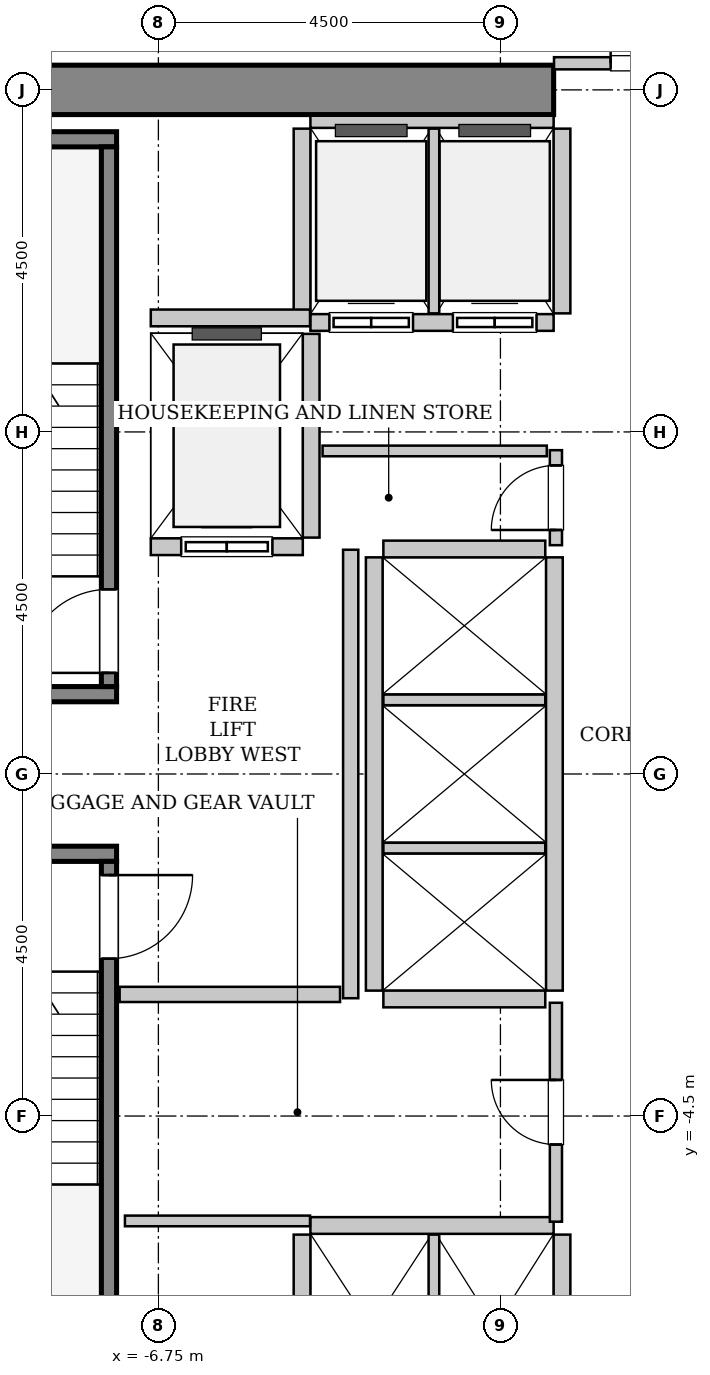
"""IFC4 building model, lengths in metres.
Left out: names, types, materials, properties, quantities, classifications, styles, units other than length and angle.
Written with IfcOpenShell. Run it as: python <this file> out.ifc"""

import sys

from ifc_helpers import new_model, si_unit, direction, frame, frame_2d, origin, place, context, subcontext, project, spatial, rectangle, extrude, source, transform, mapped, element, fill, save


model = new_model("IFC4")
c1 = context("Model", 3, precision=1e-05, world=origin(), true_north=direction((0.0, 1.0)))
c2 = subcontext(c1, "Body", "Model", "MODEL_VIEW")
j1 = project(units=[si_unit("LENGTHUNIT", "METRE"), si_unit("PLANEANGLEUNIT", "RADIAN")], contexts=[c1])
p1 = place(None, origin())
s1 = spatial("IfcSite", under=j1, at=p1, CompositionType="ELEMENT")
p2 = place(p1, origin())
s2 = spatial("IfcBuilding", under=s1, at=p2, CompositionType="ELEMENT")
p3 = place(p2, frame((0.0, 0.0, 36.8)))
s3 = spatial("IfcBuildingStorey", under=s2, at=p3, CompositionType="ELEMENT", Elevation=36.8)
m1 = source(origin(), c2, "Body", "SweptSolid", [
    extrude(rectangle(XDim=10.025, YDim=0.65, at=frame_2d((5.012, 0.0))), origin(), (0.0, 0.0, 1.0), 3.8),
])
p4 = place(p3, frame((-11.575, 9.0, 0.0), z_axis=(0.0, 0.0, 1.0), x_axis=(1.0, 0.0, 0.0)))
e1 = element("IfcWall", 1, at=p4, inside=s3, PredefinedType="SHEAR", context=c2, shape_type="MappedRepresentation", body=[
    mapped(m1, transform((0.0, 0.0, 0.0), x_axis=(1.0, 0.0, 0.0), y_axis=(0.0, 1.0, 0.0), z_axis=(0.0, 0.0, 1.0), scale=1.0)),
])
m2 = source(origin(), c2, "Body", "SweptSolid", [
    extrude(rectangle(XDim=3.4, YDim=0.2, at=frame_2d((1.7, 0.0))), origin(), (0.0, 0.0, 1.0), 3.8),
])
p5 = place(p3, frame((-7.3, 1.05, 0.0), z_axis=(0.0, 0.0, 1.0), x_axis=(-1.0, 0.0, 0.0)))
e2 = element("IfcWall", 2, at=p5, inside=s3, PredefinedType="SOLIDWALL", context=c2, shape_type="MappedRepresentation", body=[
    mapped(m2, transform((0.0, 0.0, 0.0), x_axis=(1.0, 0.0, 0.0), y_axis=(0.0, 1.0, 0.0), z_axis=(0.0, 0.0, 1.0), scale=1.0)),
])
m3 = source(origin(), c2, "Body", "SweptSolid", [
    extrude(rectangle(XDim=3.63, YDim=0.2, at=frame_2d((1.815, 0.0))), origin(), (0.0, 0.0, 1.0), 3.8),
])
p6 = place(p3, frame((-7.3, 8.35, 0.0), z_axis=(0.0, 0.0, 1.0), x_axis=(-1.0, 0.0, 0.0)))
e3 = element("IfcWall", 3, at=p6, inside=s3, PredefinedType="SOLIDWALL", context=c2, shape_type="MappedRepresentation", body=[
    mapped(m3, transform((0.0, 0.0, 0.0), x_axis=(1.0, 0.0, 0.0), y_axis=(0.0, 1.0, 0.0), z_axis=(0.0, 0.0, 1.0), scale=1.0)),
])
m4 = source(origin(), c2, "Body", "SweptSolid", [
    extrude(rectangle(XDim=7.1, YDim=0.2, at=frame_2d((3.55, 0.0))), origin(), (0.0, 0.0, 1.0), 3.8),
])
p7 = place(p3, frame((-7.4, 1.15, 0.0), z_axis=(0.0, 0.0, 1.0), x_axis=(0.0, 1.0, 0.0)))
e4 = element("IfcWall", 4, at=p7, inside=s3, PredefinedType="SOLIDWALL", context=c2, shape_type="MappedRepresentation", body=[
    mapped(m4, transform((0.0, 0.0, 0.0), x_axis=(1.0, 0.0, 0.0), y_axis=(0.0, 1.0, 0.0), z_axis=(0.0, 0.0, 1.0), scale=1.0)),
])
p8 = place(p7, frame((0.18, 0.0, 0.0)))
e5 = element("IfcOpeningElement", 5, at=p8, cuts=e4, PredefinedType="OPENING", context=c2, shape_type="SweptSolid", body=[
    extrude(rectangle(XDim=1.1, YDim=2.15, at=frame_2d((0.55, 1.075))), frame((0.0, 0.11, 0.0), z_axis=(0.0, -1.0, 0.0), x_axis=(1.0, 0.0, 0.0)), (0.0, 0.0, 1.0), 0.22),
])
p9 = place(p3, frame((-10.7, -1.05, 0.0), z_axis=(0.0, 0.0, 1.0), x_axis=(1.0, 0.0, 0.0)))
e6 = element("IfcWall", 6, at=p9, inside=s3, PredefinedType="SOLIDWALL", context=c2, shape_type="MappedRepresentation", body=[
    mapped(m2, transform((0.0, 0.0, 0.0), x_axis=(1.0, 0.0, 0.0), y_axis=(0.0, 1.0, 0.0), z_axis=(0.0, 0.0, 1.0), scale=1.0)),
])
p10 = place(p3, frame((-7.4, -1.15, 0.0), z_axis=(0.0, 0.0, 1.0), x_axis=(0.0, -1.0, 0.0)))
e7 = element("IfcWall", 7, at=p10, inside=s3, PredefinedType="SOLIDWALL", context=c2, shape_type="MappedRepresentation", body=[
    mapped(m4, transform((0.0, 0.0, 0.0), x_axis=(1.0, 0.0, 0.0), y_axis=(0.0, 1.0, 0.0), z_axis=(0.0, 0.0, 1.0), scale=1.0)),
])
p11 = place(p10, frame((0.18, 0.0, 0.0)))
e8 = element("IfcOpeningElement", 8, at=p11, cuts=e7, PredefinedType="OPENING", context=c2, shape_type="SweptSolid", body=[
    extrude(rectangle(XDim=1.1, YDim=2.15, at=frame_2d((0.55, 1.075))), frame((0.0, 0.11, 0.0), z_axis=(0.0, -1.0, 0.0), x_axis=(1.0, 0.0, 0.0)), (0.0, 0.0, 1.0), 0.22),
])
m5 = source(origin(), c2, "Body", "SweptSolid", [
    extrude(rectangle(XDim=2.0, YDim=0.22, at=frame_2d((1.0, 0.0))), origin(), (0.0, 0.0, 1.0), 3.535),
])
p12 = place(p3, frame((-6.85, 2.99, 0.0), z_axis=(0.0, 0.0, 1.0), x_axis=(1.0, 0.0, 0.0)))
e9 = element("IfcWall", 9, at=p12, inside=s3, PredefinedType="SOLIDWALL", context=c2, shape_type="MappedRepresentation", body=[
    mapped(m5, transform((0.0, 0.0, 0.0), x_axis=(1.0, 0.0, 0.0), y_axis=(0.0, 1.0, 0.0), z_axis=(0.0, 0.0, 1.0), scale=1.0)),
])
p13 = place(p12, frame((0.4, 0.0, 0.0)))
e10 = element("IfcOpeningElement", 10, at=p13, cuts=e9, PredefinedType="OPENING", context=c2, shape_type="SweptSolid", body=[
    extrude(rectangle(XDim=1.2, YDim=2.2, at=frame_2d((0.6, 1.1))), frame((0.0, 0.12, 0.0), z_axis=(0.0, -1.0, 0.0), x_axis=(1.0, 0.0, 0.0)), (0.0, 0.0, 1.0), 0.24),
])
m6 = source(origin(), c2, "Body", "SweptSolid", [
    extrude(rectangle(XDim=2.68, YDim=0.22, at=frame_2d((1.34, 0.0))), origin(), (0.0, 0.0, 1.0), 3.535),
])
p14 = place(p3, frame((-4.74, 3.11, 0.0), z_axis=(0.0, 0.0, 1.0), x_axis=(0.0, 1.0, 0.0)))
e11 = element("IfcWall", 11, at=p14, inside=s3, PredefinedType="SOLIDWALL", context=c2, shape_type="MappedRepresentation", body=[
    mapped(m6, transform((0.0, 0.0, 0.0), x_axis=(1.0, 0.0, 0.0), y_axis=(0.0, 1.0, 0.0), z_axis=(0.0, 0.0, 1.0), scale=1.0)),
])
m7 = source(origin(), c2, "Body", "SweptSolid", [
    extrude(rectangle(XDim=3.2, YDim=0.22, at=frame_2d((1.6, 0.0))), origin(), (0.0, 0.0, 1.0), 3.535),
])
p15 = place(p3, frame((-4.75, 5.94, 0.0), z_axis=(0.0, 0.0, 1.0), x_axis=(1.0, 0.0, 0.0)))
e12 = element("IfcWall", 12, at=p15, inside=s3, PredefinedType="SOLIDWALL", context=c2, shape_type="MappedRepresentation", body=[
    mapped(m7, transform((0.0, 0.0, 0.0), x_axis=(1.0, 0.0, 0.0), y_axis=(0.0, 1.0, 0.0), z_axis=(0.0, 0.0, 1.0), scale=1.0)),
])
p16 = place(p15, frame((0.25, 0.0, 0.0)))
e13 = element("IfcOpeningElement", 13, at=p16, cuts=e12, PredefinedType="OPENING", context=c2, shape_type="SweptSolid", body=[
    extrude(rectangle(XDim=1.1, YDim=2.2, at=frame_2d((0.55, 1.1))), frame((0.0, 0.12, 0.0), z_axis=(0.0, -1.0, 0.0), x_axis=(1.0, 0.0, 0.0)), (0.0, 0.0, 1.0), 0.24),
])
p17 = place(p15, frame((1.875, 0.0, 0.0)))
e14 = element("IfcOpeningElement", 14, at=p17, cuts=e12, PredefinedType="OPENING", context=c2, shape_type="SweptSolid", body=[
    extrude(rectangle(XDim=1.1, YDim=2.2, at=frame_2d((0.55, 1.1))), frame((0.0, 0.12, 0.0), z_axis=(0.0, -1.0, 0.0), x_axis=(1.0, 0.0, 0.0)), (0.0, 0.0, 1.0), 0.24),
])
m8 = source(origin(), c2, "Body", "SweptSolid", [
    extrude(rectangle(XDim=3.2, YDim=0.16, at=frame_2d((1.6, 0.0))), origin(), (0.0, 0.0, 1.0), 2.425),
])
p18 = place(p3, frame((-1.55, 8.58, 0.0), z_axis=(0.0, 0.0, 1.0), x_axis=(-1.0, 0.0, 0.0)))
e15 = element("IfcWall", 15, at=p18, inside=s3, PredefinedType="PARTITIONING", context=c2, shape_type="MappedRepresentation", body=[
    mapped(m8, transform((0.0, 0.0, 0.0), x_axis=(1.0, 0.0, 0.0), y_axis=(0.0, 1.0, 0.0), z_axis=(0.0, 0.0, 1.0), scale=1.0)),
])
m9 = source(origin(), c2, "Body", "SweptSolid", [
    extrude(rectangle(XDim=2.43, YDim=0.22, at=frame_2d((1.215, 0.0))), origin(), (0.0, 0.0, 1.0), 3.535),
])
p19 = place(p3, frame((-4.86, 8.49, 0.0), z_axis=(0.0, 0.0, 1.0), x_axis=(0.0, -1.0, 0.0)))
e16 = element("IfcWall", 16, at=p19, inside=s3, PredefinedType="SOLIDWALL", context=c2, shape_type="MappedRepresentation", body=[
    mapped(m9, transform((0.0, 0.0, 0.0), x_axis=(1.0, 0.0, 0.0), y_axis=(0.0, 1.0, 0.0), z_axis=(0.0, 0.0, 1.0), scale=1.0)),
])
m10 = source(origin(), c2, "Body", "SweptSolid", [
    extrude(rectangle(XDim=2.43, YDim=0.14, at=frame_2d((1.215, 0.0))), origin(), (0.0, 0.0, 1.0), 3.535),
])
p20 = place(p3, frame((-3.125, 6.06, 0.0), z_axis=(0.0, 0.0, 1.0), x_axis=(0.0, 1.0, 0.0)))
e17 = element("IfcWall", 17, at=p20, inside=s3, PredefinedType="PARTITIONING", context=c2, shape_type="MappedRepresentation", body=[
    mapped(m10, transform((0.0, 0.0, 0.0), x_axis=(1.0, 0.0, 0.0), y_axis=(0.0, 1.0, 0.0), z_axis=(0.0, 0.0, 1.0), scale=1.0)),
])
p21 = place(p3, frame((-1.44, 6.06, 0.0), z_axis=(0.0, 0.0, 1.0), x_axis=(0.0, 1.0, 0.0)))
e18 = element("IfcWall", 18, at=p21, inside=s3, PredefinedType="SOLIDWALL", context=c2, shape_type="MappedRepresentation", body=[
    mapped(m9, transform((0.0, 0.0, 0.0), x_axis=(1.0, 0.0, 0.0), y_axis=(0.0, 1.0, 0.0), z_axis=(0.0, 0.0, 1.0), scale=1.0)),
])
p22 = place(p3, frame((-1.55, -5.94, 0.0), z_axis=(0.0, 0.0, 1.0), x_axis=(-1.0, 0.0, 0.0)))
e19 = element("IfcWall", 19, at=p22, inside=s3, PredefinedType="SOLIDWALL", context=c2, shape_type="MappedRepresentation", body=[
    mapped(m7, transform((0.0, 0.0, 0.0), x_axis=(1.0, 0.0, 0.0), y_axis=(0.0, 1.0, 0.0), z_axis=(0.0, 0.0, 1.0), scale=1.0)),
])
p23 = place(p3, frame((-4.86, -6.06, 0.0), z_axis=(0.0, 0.0, 1.0), x_axis=(0.0, -1.0, 0.0)))
e20 = element("IfcWall", 20, at=p23, inside=s3, PredefinedType="SOLIDWALL", context=c2, shape_type="MappedRepresentation", body=[
    mapped(m9, transform((0.0, 0.0, 0.0), x_axis=(1.0, 0.0, 0.0), y_axis=(0.0, 1.0, 0.0), z_axis=(0.0, 0.0, 1.0), scale=1.0)),
])
p24 = place(p3, frame((-3.125, -8.49, 0.0), z_axis=(0.0, 0.0, 1.0), x_axis=(0.0, 1.0, 0.0)))
e21 = element("IfcWall", 21, at=p24, inside=s3, PredefinedType="PARTITIONING", context=c2, shape_type="MappedRepresentation", body=[
    mapped(m10, transform((0.0, 0.0, 0.0), x_axis=(1.0, 0.0, 0.0), y_axis=(0.0, 1.0, 0.0), z_axis=(0.0, 0.0, 1.0), scale=1.0)),
])
p25 = place(p3, frame((-1.44, -8.49, 0.0), z_axis=(0.0, 0.0, 1.0), x_axis=(0.0, 1.0, 0.0)))
e22 = element("IfcWall", 22, at=p25, inside=s3, PredefinedType="SOLIDWALL", context=c2, shape_type="MappedRepresentation", body=[
    mapped(m9, transform((0.0, 0.0, 0.0), x_axis=(1.0, 0.0, 0.0), y_axis=(0.0, 1.0, 0.0), z_axis=(0.0, 0.0, 1.0), scale=1.0)),
])
m11 = source(origin(), c2, "Body", "SweptSolid", [
    extrude(rectangle(XDim=5.7, YDim=0.22, at=frame_2d((2.85, 0.0))), origin(), (0.0, 0.0, 1.0), 3.535),
])
for number, where, z_axis, x_axis in (
    (23, (-1.54, -2.85, 0.0), (0.0, 0.0, 1.0), (0.0, 1.0, 0.0)),
    (24, (-3.91, 2.85, 0.0), (0.0, 0.0, 1.0), (0.0, -1.0, 0.0)),
):
    element("IfcWall", number, at=place(p3, frame(where, z_axis=z_axis, x_axis=x_axis)), inside=s3, PredefinedType="SOLIDWALL", context=c2, shape_type="MappedRepresentation", body=[
        mapped(m11, transform((0.0, 0.0, 0.0), x_axis=(1.0, 0.0, 0.0), y_axis=(0.0, 1.0, 0.0), z_axis=(0.0, 0.0, 1.0), scale=1.0)),
    ])
m12 = source(origin(), c2, "Body", "SweptSolid", [
    extrude(rectangle(XDim=2.13, YDim=0.22, at=frame_2d((1.065, 0.0))), origin(), (0.0, 0.0, 1.0), 3.535),
])
p26 = place(p3, frame((-3.79, -2.96, 0.0), z_axis=(0.0, 0.0, 1.0), x_axis=(1.0, 0.0, 0.0)))
e25 = element("IfcWall", 25, at=p26, inside=s3, PredefinedType="SOLIDWALL", context=c2, shape_type="MappedRepresentation", body=[
    mapped(m12, transform((0.0, 0.0, 0.0), x_axis=(1.0, 0.0, 0.0), y_axis=(0.0, 1.0, 0.0), z_axis=(0.0, 0.0, 1.0), scale=1.0)),
])
m13 = source(origin(), c2, "Body", "SweptSolid", [
    extrude(rectangle(XDim=2.13, YDim=0.14, at=frame_2d((1.065, 0.0))), origin(), (0.0, 0.0, 1.0), 3.535),
])
for number, where, z_axis, x_axis in (
    (26, (-3.79, -0.975, 0.0), (0.0, 0.0, 1.0), (1.0, 0.0, 0.0)),
    (27, (-3.79, 0.975, 0.0), (0.0, 0.0, 1.0), (1.0, 0.0, 0.0)),
):
    element("IfcWall", number, at=place(p3, frame(where, z_axis=z_axis, x_axis=x_axis)), inside=s3, PredefinedType="PARTITIONING", context=c2, shape_type="MappedRepresentation", body=[
        mapped(m13, transform((0.0, 0.0, 0.0), x_axis=(1.0, 0.0, 0.0), y_axis=(0.0, 1.0, 0.0), z_axis=(0.0, 0.0, 1.0), scale=1.0)),
    ])
p27 = place(p3, frame((-1.66, 2.96, 0.0), z_axis=(0.0, 0.0, 1.0), x_axis=(-1.0, 0.0, 0.0)))
e28 = element("IfcWall", 28, at=p27, inside=s3, PredefinedType="SOLIDWALL", context=c2, shape_type="MappedRepresentation", body=[
    mapped(m12, transform((0.0, 0.0, 0.0), x_axis=(1.0, 0.0, 0.0), y_axis=(0.0, 1.0, 0.0), z_axis=(0.0, 0.0, 1.0), scale=1.0)),
])
m14 = source(origin(), c2, "Body", "SweptSolid", [
    extrude(rectangle(XDim=2.095, YDim=0.22, at=frame_2d((1.048, 0.0))), origin(), (0.0, 0.0, 1.0), 3.535),
])
p28 = place(p3, frame((-6.85, 6.0, 0.0), z_axis=(0.0, 0.0, 1.0), x_axis=(1.0, 0.0, 0.0)))
e29 = element("IfcWall", 29, at=p28, inside=s3, PredefinedType="SOLIDWALL", context=c2, shape_type="MappedRepresentation", body=[
    mapped(m14, transform((0.0, 0.0, 0.0), x_axis=(1.0, 0.0, 0.0), y_axis=(0.0, 1.0, 0.0), z_axis=(0.0, 0.0, 1.0), scale=1.0)),
])
m15 = source(origin(), c2, "Body", "SweptSolid", [
    extrude(rectangle(XDim=5.9, YDim=0.2, at=frame_2d((2.95, 0.0))), origin(), (0.0, 0.0, 1.0), 3.535),
])
p29 = place(p3, frame((-4.22, -2.95, 0.0), z_axis=(0.0, 0.0, 1.0), x_axis=(0.0, 1.0, 0.0)))
e30 = element("IfcWall", 30, at=p29, inside=s3, PredefinedType="PARTITIONING", context=c2, shape_type="MappedRepresentation", body=[
    mapped(m15, transform((0.0, 0.0, 0.0), x_axis=(1.0, 0.0, 0.0), y_axis=(0.0, 1.0, 0.0), z_axis=(0.0, 0.0, 1.0), scale=1.0)),
])
m16 = source(origin(), c2, "Body", "SweptSolid", [
    extrude(rectangle(XDim=2.9, YDim=0.2, at=frame_2d((1.45, 0.0))), origin(), (0.0, 0.0, 1.0), 3.535),
])
p30 = place(p3, frame((-7.26, -2.9, 0.0), z_axis=(0.0, 0.0, 1.0), x_axis=(1.0, 0.0, 0.0)))
e31 = element("IfcWall", 31, at=p30, inside=s3, PredefinedType="PARTITIONING", context=c2, shape_type="MappedRepresentation", body=[
    mapped(m16, transform((0.0, 0.0, 0.0), x_axis=(1.0, 0.0, 0.0), y_axis=(0.0, 1.0, 0.0), z_axis=(0.0, 0.0, 1.0), scale=1.0)),
])
m17 = source(origin(), c2, "Body", "SweptSolid", [
    extrude(rectangle(XDim=3.09, YDim=0.16, at=frame_2d((1.545, 0.0))), origin(), (0.0, 0.0, 1.0), 2.425),
])
p31 = place(p3, frame((-1.545, 9.35, 0.0), z_axis=(0.0, 0.0, 1.0), x_axis=(1.0, 0.0, 0.0)))
e32 = element("IfcWall", 32, at=p31, inside=s3, PredefinedType="PARTITIONING", context=c2, shape_type="MappedRepresentation", body=[
    mapped(m17, transform((0.0, 0.0, 0.0), x_axis=(1.0, 0.0, 0.0), y_axis=(0.0, 1.0, 0.0), z_axis=(0.0, 0.0, 1.0), scale=1.0)),
])
p32 = place(p31, frame((0.745, 0.0, 0.0)))
e33 = element("IfcOpeningElement", 33, at=p32, cuts=e32, PredefinedType="OPENING", context=c2, shape_type="SweptSolid", body=[
    extrude(rectangle(XDim=1.6, YDim=2.3, at=frame_2d((0.8, 1.15))), frame((0.0, 0.09, 0.0), z_axis=(0.0, -1.0, 0.0), x_axis=(1.0, 0.0, 0.0)), (0.0, 0.0, 1.0), 0.18),
])
m18 = source(origin(), c2, "Body", "SweptSolid", [
    extrude(rectangle(XDim=1.25, YDim=0.16, at=frame_2d((0.625, 0.0))), origin(), (0.0, 0.0, 1.0), 3.535),
])
p33 = place(p3, frame((-1.52, 3.01, 0.0), z_axis=(0.0, 0.0, 1.0), x_axis=(0.0, 1.0, 0.0)))
e34 = element("IfcWall", 34, at=p33, inside=s3, PredefinedType="PARTITIONING", context=c2, shape_type="MappedRepresentation", body=[
    mapped(m18, transform((0.0, 0.0, 0.0), x_axis=(1.0, 0.0, 0.0), y_axis=(0.0, 1.0, 0.0), z_axis=(0.0, 0.0, 1.0), scale=1.0)),
])
p34 = place(p33, frame((0.2, 0.0, 0.0)))
e35 = element("IfcOpeningElement", 35, at=p34, cuts=e34, PredefinedType="OPENING", context=c2, shape_type="SweptSolid", body=[
    extrude(rectangle(XDim=0.85, YDim=2.1, at=frame_2d((0.425, 1.05))), frame((0.0, 0.09, 0.0), z_axis=(0.0, -1.0, 0.0), x_axis=(1.0, 0.0, 0.0)), (0.0, 0.0, 1.0), 0.18),
])
m19 = source(origin(), c2, "Body", "SweptSolid", [
    extrude(rectangle(XDim=2.95, YDim=0.14, at=frame_2d((1.475, 0.0))), origin(), (0.0, 0.0, 1.0), 3.535),
])
p35 = place(p3, frame((-4.59, 4.25, 0.0), z_axis=(0.0, 0.0, 1.0), x_axis=(1.0, 0.0, 0.0)))
e36 = element("IfcWall", 36, at=p35, inside=s3, PredefinedType="PARTITIONING", context=c2, shape_type="MappedRepresentation", body=[
    mapped(m19, transform((0.0, 0.0, 0.0), x_axis=(1.0, 0.0, 0.0), y_axis=(0.0, 1.0, 0.0), z_axis=(0.0, 0.0, 1.0), scale=1.0)),
])
m20 = source(origin(), c2, "Body", "SweptSolid", [
    extrude(rectangle(XDim=2.88, YDim=0.16, at=frame_2d((1.44, 0.0))), origin(), (0.0, 0.0, 1.0), 3.535),
])
p36 = place(p3, frame((-1.52, -5.89, 0.0), z_axis=(0.0, 0.0, 1.0), x_axis=(0.0, 1.0, 0.0)))
e37 = element("IfcWall", 37, at=p36, inside=s3, PredefinedType="PARTITIONING", context=c2, shape_type="MappedRepresentation", body=[
    mapped(m20, transform((0.0, 0.0, 0.0), x_axis=(1.0, 0.0, 0.0), y_axis=(0.0, 1.0, 0.0), z_axis=(0.0, 0.0, 1.0), scale=1.0)),
])
p37 = place(p36, frame((1.015, 0.0, 0.0)))
e38 = element("IfcOpeningElement", 38, at=p37, cuts=e37, PredefinedType="OPENING", context=c2, shape_type="SweptSolid", body=[
    extrude(rectangle(XDim=0.85, YDim=2.1, at=frame_2d((0.425, 1.05))), frame((0.0, 0.09, 0.0), z_axis=(0.0, -1.0, 0.0), x_axis=(1.0, 0.0, 0.0)), (0.0, 0.0, 1.0), 0.18),
])
m21 = source(origin(), c2, "Body", "SweptSolid", [
    extrude(rectangle(XDim=2.435, YDim=0.14, at=frame_2d((1.218, 0.0))), origin(), (0.0, 0.0, 1.0), 3.535),
])
p38 = place(p3, frame((-7.19, -5.88, 0.0), z_axis=(0.0, 0.0, 1.0), x_axis=(1.0, 0.0, 0.0)))
e39 = element("IfcWall", 39, at=p38, inside=s3, PredefinedType="PARTITIONING", context=c2, shape_type="MappedRepresentation", body=[
    mapped(m21, transform((0.0, 0.0, 0.0), x_axis=(1.0, 0.0, 0.0), y_axis=(0.0, 1.0, 0.0), z_axis=(0.0, 0.0, 1.0), scale=1.0)),
])
m22 = source(origin(), c2, "Body", "SweptSolid", [
    extrude(rectangle(XDim=1.1, YDim=2.15, at=frame_2d((0.55, 1.075))), frame((0.0, 0.025, 0.0), z_axis=(0.0, -1.0, 0.0), x_axis=(1.0, 0.0, 0.0)), (0.0, 0.0, 1.0), 0.05),
])
p39 = place(p8, origin())
e40 = element("IfcDoor", 40, at=p39, inside=s3, OperationType="SINGLE_SWING_LEFT", PredefinedType="DOOR", context=c2, shape_type="MappedRepresentation", body=[
    mapped(m22, transform((0.0, 0.0, 0.0), x_axis=(1.0, 0.0, 0.0), y_axis=(0.0, 1.0, 0.0), z_axis=(0.0, 0.0, 1.0), scale=1.0)),
])
fill(e5, e40)
p40 = place(p11, origin())
e41 = element("IfcDoor", 41, at=p40, inside=s3, OperationType="SINGLE_SWING_LEFT", PredefinedType="DOOR", context=c2, shape_type="MappedRepresentation", body=[
    mapped(m22, transform((0.0, 0.0, 0.0), x_axis=(1.0, 0.0, 0.0), y_axis=(0.0, 1.0, 0.0), z_axis=(0.0, 0.0, 1.0), scale=1.0)),
])
fill(e8, e41)
m23 = source(origin(), c2, "Body", "SweptSolid", [
    extrude(rectangle(XDim=1.2, YDim=2.2, at=frame_2d((0.6, 1.1))), frame((0.0, 0.025, 0.0), z_axis=(0.0, -1.0, 0.0), x_axis=(1.0, 0.0, 0.0)), (0.0, 0.0, 1.0), 0.05),
])
p41 = place(p13, origin())
e42 = element("IfcDoor", 42, at=p41, inside=s3, OperationType="SLIDING_TO_LEFT", PredefinedType="DOOR", context=c2, shape_type="MappedRepresentation", body=[
    mapped(m23, transform((0.0, 0.0, 0.0), x_axis=(1.0, 0.0, 0.0), y_axis=(0.0, 1.0, 0.0), z_axis=(0.0, 0.0, 1.0), scale=1.0)),
])
fill(e10, e42)
m24 = source(origin(), c2, "Body", "SweptSolid", [
    extrude(rectangle(XDim=1.1, YDim=2.2, at=frame_2d((0.55, 1.1))), frame((0.0, 0.025, 0.0), z_axis=(0.0, -1.0, 0.0), x_axis=(1.0, 0.0, 0.0)), (0.0, 0.0, 1.0), 0.05),
])
p42 = place(p16, origin())
e43 = element("IfcDoor", 43, at=p42, inside=s3, OperationType="DOUBLE_DOOR_SLIDING", PredefinedType="DOOR", context=c2, shape_type="MappedRepresentation", body=[
    mapped(m24, transform((0.0, 0.0, 0.0), x_axis=(1.0, 0.0, 0.0), y_axis=(0.0, 1.0, 0.0), z_axis=(0.0, 0.0, 1.0), scale=1.0)),
])
fill(e13, e43)
p43 = place(p17, origin())
e44 = element("IfcDoor", 44, at=p43, inside=s3, OperationType="DOUBLE_DOOR_SLIDING", PredefinedType="DOOR", context=c2, shape_type="MappedRepresentation", body=[
    mapped(m24, transform((0.0, 0.0, 0.0), x_axis=(1.0, 0.0, 0.0), y_axis=(0.0, 1.0, 0.0), z_axis=(0.0, 0.0, 1.0), scale=1.0)),
])
fill(e14, e44)
m25 = source(origin(), c2, "Body", "SweptSolid", [
    extrude(rectangle(XDim=1.6, YDim=2.3, at=frame_2d((0.8, 1.15))), frame((0.0, 0.025, 0.0), z_axis=(0.0, -1.0, 0.0), x_axis=(1.0, 0.0, 0.0)), (0.0, 0.0, 1.0), 0.05),
])
p44 = place(p32, origin())
e45 = element("IfcDoor", 45, at=p44, inside=s3, OperationType="DOUBLE_DOOR_SINGLE_SWING", PredefinedType="DOOR", context=c2, shape_type="MappedRepresentation", body=[
    mapped(m25, transform((0.0, 0.0, 0.0), x_axis=(1.0, 0.0, 0.0), y_axis=(0.0, 1.0, 0.0), z_axis=(0.0, 0.0, 1.0), scale=1.0)),
])
fill(e33, e45)
m26 = source(origin(), c2, "Body", "SweptSolid", [
    extrude(rectangle(XDim=0.85, YDim=2.1, at=frame_2d((0.425, 1.05))), frame((0.0, 0.025, 0.0), z_axis=(0.0, -1.0, 0.0), x_axis=(1.0, 0.0, 0.0)), (0.0, 0.0, 1.0), 0.05),
])
p45 = place(p34, origin())
e46 = element("IfcDoor", 46, at=p45, inside=s3, OperationType="SINGLE_SWING_LEFT", PredefinedType="DOOR", context=c2, shape_type="MappedRepresentation", body=[
    mapped(m26, transform((0.0, 0.0, 0.0), x_axis=(1.0, 0.0, 0.0), y_axis=(0.0, 1.0, 0.0), z_axis=(0.0, 0.0, 1.0), scale=1.0)),
])
fill(e35, e46)
p46 = place(p37, origin())
e47 = element("IfcDoor", 47, at=p46, inside=s3, OperationType="SINGLE_SWING_RIGHT", PredefinedType="DOOR", context=c2, shape_type="MappedRepresentation", body=[
    mapped(m26, transform((0.0, 0.0, 0.0), x_axis=(1.0, 0.0, 0.0), y_axis=(0.0, 1.0, 0.0), z_axis=(0.0, 0.0, 1.0), scale=1.0)),
])
fill(e38, e47)
save(model, sys.argv[1])
